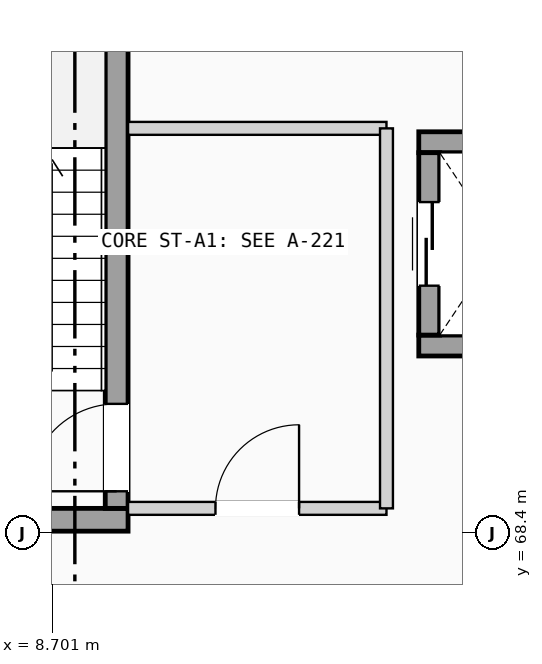
"""IFC4 building model, lengths in metres.
Left out: names, types, materials, properties, quantities, classifications, styles, units other than length and angle.
Written with IfcOpenShell. Run it as: python <this file> out.ifc"""

import sys

from ifc_helpers import new_model, si_unit, direction, frame, frame_2d, origin, place, context, subcontext, project, spatial, rectangle, extrude, element, fill, save


model = new_model("IFC4")
c1 = context("Model", 3, precision=1e-05, world=origin(), true_north=direction((0.0, 1.0)))
c2 = subcontext(c1, "Body", "Model", "MODEL_VIEW")
j1 = project(units=[si_unit("LENGTHUNIT", "METRE"), si_unit("PLANEANGLEUNIT", "RADIAN")], contexts=[c1])
p1 = place(None, origin())
s1 = spatial("IfcSite", under=j1, at=p1, CompositionType="ELEMENT")
p2 = place(p1, origin())
s2 = spatial("IfcBuilding", under=s1, at=p2, CompositionType="ELEMENT")
p3 = place(p2, frame((0.0, 0.0, -4.2)))
s3 = spatial("IfcBuildingStorey", under=s2, at=p3, CompositionType="ELEMENT", Elevation=-4.2)
p4 = place(p3, frame((5.775, 68.57, 0.0), z_axis=(0.0, 0.0, 1.0), x_axis=(1.0, 0.0, 0.0)))
e1 = element("IfcWall", 1, at=p4, inside=s3, PredefinedType="SHEAR", context=c2, shape_type="SweptSolid", body=[
    extrude(rectangle(XDim=3.925, YDim=0.3, at=frame_2d((1.962, 0.0))), origin(), (0.0, 0.0, 1.0), 3.92),
])
p5 = place(p3, frame((9.55, 68.72, 0.0), z_axis=(0.0, 0.0, 1.0), x_axis=(0.0, 1.0, 0.0)))
e2 = element("IfcWall", 2, at=p5, inside=s3, PredefinedType="SHEAR", context=c2, shape_type="SweptSolid", body=[
    extrude(rectangle(XDim=7.0, YDim=0.3, at=frame_2d((3.5, 0.0))), origin(), (0.0, 0.0, 1.0), 3.92),
])
p6 = place(p5, frame((0.225, 0.0, 0.0)))
e3 = element("IfcOpeningElement", 3, at=p6, cuts=e2, PredefinedType="OPENING", context=c2, shape_type="SweptSolid", body=[
    extrude(rectangle(XDim=1.15, YDim=2.12, at=frame_2d((0.575, 1.06))), frame((0.0, 0.16, 0.0), z_axis=(0.0, -1.0, 0.0), x_axis=(1.0, 0.0, 0.0)), (0.0, 0.0, 1.0), 0.32),
])
for number, where, z_axis, x_axis in (
    (4, (13.525, 70.863, 0.0), (0.0, 0.0, 1.0), (1.0, 0.0, 0.0)),
    (5, (13.525, 73.538, 0.0), (0.0, 0.0, 1.0), (1.0, 0.0, 0.0)),
):
    element("IfcWall", number, at=place(p3, frame(where, z_axis=z_axis, x_axis=x_axis)), inside=s3, PredefinedType="SHEAR", context=c2, shape_type="SweptSolid", body=[
        extrude(rectangle(XDim=2.15, YDim=0.275, at=frame_2d((1.075, 0.0))), origin(), (0.0, 0.0, 1.0), 3.92),
    ])
p7 = place(p3, frame((13.663, 71.0, 0.0), z_axis=(0.0, 0.0, 1.0), x_axis=(0.0, 1.0, 0.0)))
e6 = element("IfcWall", 6, at=p7, inside=s3, PredefinedType="SHEAR", context=c2, shape_type="SweptSolid", body=[
    extrude(rectangle(XDim=2.4, YDim=0.275, at=frame_2d((1.2, 0.0))), origin(), (0.0, 0.0, 1.0), 3.92),
])
p8 = place(p7, frame((0.65, 0.0, 0.0)))
e7 = element("IfcOpeningElement", 7, at=p8, cuts=e6, PredefinedType="OPENING", context=c2, shape_type="SweptSolid", body=[
    extrude(rectangle(XDim=1.1, YDim=2.15, at=frame_2d((0.55, 1.075))), frame((0.0, 0.147, 0.0), z_axis=(0.0, -1.0, 0.0), x_axis=(1.0, 0.0, 0.0)), (0.0, 0.0, 1.0), 0.295),
])
p9 = place(p3, frame((9.7, 68.72, 0.0), z_axis=(0.0, 0.0, 1.0), x_axis=(1.0, 0.0, 0.0)))
e8 = element("IfcWall", 8, at=p9, inside=s3, PredefinedType="PARTITIONING", context=c2, shape_type="SweptSolid", body=[
    extrude(rectangle(XDim=3.4, YDim=0.17, at=frame_2d((1.7, 0.0))), origin(), (0.0, 0.0, 1.0), 3.19),
])
p10 = place(p9, frame((1.15, 0.0, 0.0)))
e9 = element("IfcOpeningElement", 9, at=p10, cuts=e8, PredefinedType="OPENING", context=c2, shape_type="SweptSolid", body=[
    extrude(rectangle(XDim=1.1, YDim=2.12, at=frame_2d((0.55, 1.06))), frame((0.0, 0.095, 0.0), z_axis=(0.0, -1.0, 0.0), x_axis=(1.0, 0.0, 0.0)), (0.0, 0.0, 1.0), 0.19),
])
p11 = place(p3, frame((9.7, 73.72, 0.0), z_axis=(0.0, 0.0, 1.0), x_axis=(1.0, 0.0, 0.0)))
e10 = element("IfcWall", 10, at=p11, inside=s3, PredefinedType="PARTITIONING", context=c2, shape_type="SweptSolid", body=[
    extrude(rectangle(XDim=3.4, YDim=0.17, at=frame_2d((1.7, 0.0))), origin(), (0.0, 0.0, 1.0), 3.84),
])
p12 = place(p3, frame((13.1, 68.72, 0.0), z_axis=(0.0, 0.0, 1.0), x_axis=(0.0, 1.0, 0.0)))
e11 = element("IfcWall", 11, at=p12, inside=s3, PredefinedType="PARTITIONING", context=c2, shape_type="SweptSolid", body=[
    extrude(rectangle(XDim=5.0, YDim=0.17, at=frame_2d((2.5, 0.0))), origin(), (0.0, 0.0, 1.0), 3.84),
])
p13 = place(p6, origin())
e12 = element("IfcDoor", 12, at=p13, inside=s3, OperationType="SINGLE_SWING_LEFT", PredefinedType="DOOR", context=c2, shape_type="SweptSolid", body=[
    extrude(rectangle(XDim=1.15, YDim=2.12, at=frame_2d((0.575, 1.06))), frame((0.0, 0.025, 0.0), z_axis=(0.0, -1.0, 0.0), x_axis=(1.0, 0.0, 0.0)), (0.0, 0.0, 1.0), 0.05),
])
fill(e3, e12)
p14 = place(p8, origin())
e13 = element("IfcDoor", 13, at=p14, inside=s3, OperationType="SLIDING_TO_LEFT", PredefinedType="DOOR", context=c2, shape_type="SweptSolid", body=[
    extrude(rectangle(XDim=1.1, YDim=2.15, at=frame_2d((0.55, 1.075))), frame((0.0, 0.025, 0.0), z_axis=(0.0, -1.0, 0.0), x_axis=(1.0, 0.0, 0.0)), (0.0, 0.0, 1.0), 0.05),
])
fill(e7, e13)
p15 = place(p10, origin())
e14 = element("IfcDoor", 14, at=p15, inside=s3, OperationType="SINGLE_SWING_RIGHT", PredefinedType="DOOR", context=c2, shape_type="SweptSolid", body=[
    extrude(rectangle(XDim=1.1, YDim=2.12, at=frame_2d((0.55, 1.06))), frame((0.0, 0.025, 0.0), z_axis=(0.0, -1.0, 0.0), x_axis=(1.0, 0.0, 0.0)), (0.0, 0.0, 1.0), 0.05),
])
fill(e9, e14)
save(model, sys.argv[1])
